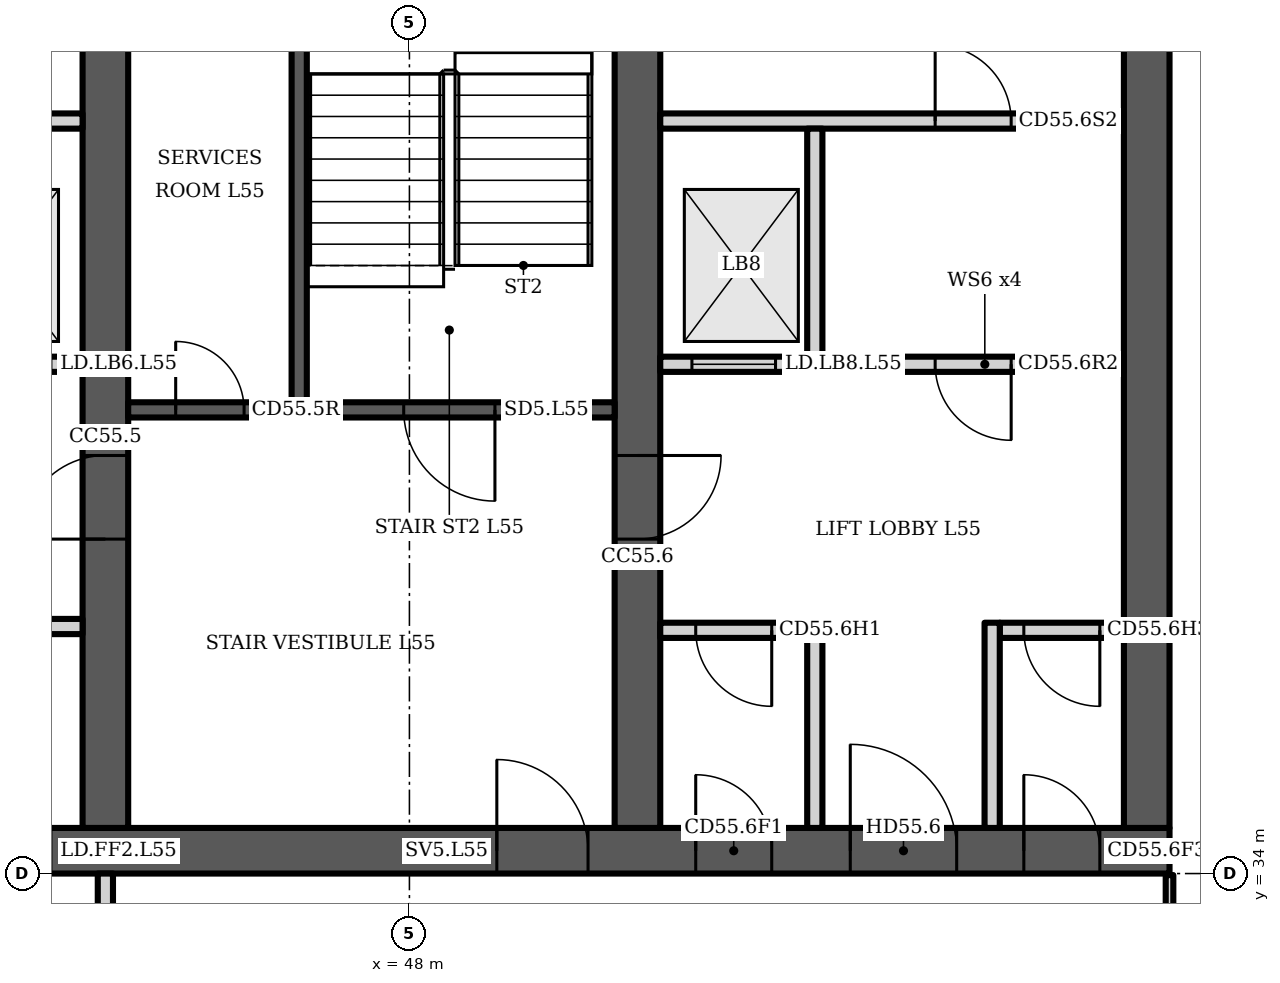
"""IFC4 building model, lengths in metres.
Left out: names, types, materials, properties, quantities, classifications, styles, units other than length and angle.
Written with IfcOpenShell. Run it as: python <this file> out.ifc"""

import sys

from ifc_helpers import new_model, si_unit, direction, frame, frame_2d, origin, place, context, subcontext, project, spatial, polyline, rectangle, outline, extrude, element, fill, save


model = new_model("IFC4")
c1 = context("Model", 3, precision=1e-05, world=origin(), true_north=direction((0.0, 1.0)))
c2 = subcontext(c1, "Body", "Model", "MODEL_VIEW")
j1 = project(units=[si_unit("LENGTHUNIT", "METRE"), si_unit("PLANEANGLEUNIT", "RADIAN")], contexts=[c1])
p1 = place(None, origin())
s1 = spatial("IfcSite", under=j1, at=p1, CompositionType="ELEMENT")
p2 = place(p1, origin())
s2 = spatial("IfcBuilding", under=s1, at=p2, CompositionType="ELEMENT")
p3 = place(p2, frame((0.0, 0.0, 221.5)))
s3 = spatial("IfcBuildingStorey", under=s2, at=p3, CompositionType="ELEMENT", Elevation=221.5)
p4 = place(p3, frame((23.0, 34.3, 0.0), z_axis=(0.0, 0.0, 1.0), x_axis=(1.0, 0.0, 0.0)))
e1 = element("IfcWall", 1, at=p4, inside=s3, PredefinedType="SHEAR", context=c2, shape_type="SweptSolid", body=[
    extrude(rectangle(XDim=35.0, YDim=0.6, at=frame_2d((17.5, 0.0))), origin(), (0.0, 0.0, 1.0), 3.6),
])
p5 = place(p4, frame((0.65, 0.0, 0.0)))
e2 = element("IfcOpeningElement", 2, at=p5, cuts=e1, PredefinedType="OPENING", context=c2, shape_type="SweptSolid", body=[
    extrude(rectangle(XDim=1.2, YDim=2.1, at=frame_2d((0.6, 1.05))), frame((0.0, 0.31, 0.0), z_axis=(0.0, -1.0, 0.0), x_axis=(1.0, 0.0, 0.0)), (0.0, 0.0, 1.0), 0.62),
])
p6 = place(p4, frame((7.717, 0.0, 0.0)))
e3 = element("IfcOpeningElement", 3, at=p6, cuts=e1, PredefinedType="OPENING", context=c2, shape_type="SweptSolid", body=[
    extrude(rectangle(XDim=1.1, YDim=2.1, at=frame_2d((0.55, 1.05))), frame((0.0, 0.31, 0.0), z_axis=(0.0, -1.0, 0.0), x_axis=(1.0, 0.0, 0.0)), (0.0, 0.0, 1.0), 0.62),
])
p7 = place(p4, frame((12.183, 0.0, 0.0)))
e4 = element("IfcOpeningElement", 4, at=p7, cuts=e1, PredefinedType="OPENING", context=c2, shape_type="SweptSolid", body=[
    extrude(rectangle(XDim=1.1, YDim=2.1, at=frame_2d((0.55, 1.05))), frame((0.0, 0.31, 0.0), z_axis=(0.0, -1.0, 0.0), x_axis=(1.0, 0.0, 0.0)), (0.0, 0.0, 1.0), 0.62),
])
p8 = place(p4, frame((9.8, 0.0, 0.0)))
e5 = element("IfcOpeningElement", 5, at=p8, cuts=e1, PredefinedType="OPENING", context=c2, shape_type="SweptSolid", body=[
    extrude(rectangle(XDim=1.4, YDim=2.1, at=frame_2d((0.7, 1.05))), frame((0.0, 0.31, 0.0), z_axis=(0.0, -1.0, 0.0), x_axis=(1.0, 0.0, 0.0)), (0.0, 0.0, 1.0), 0.62),
])
p9 = place(p4, frame((14.717, 0.0, 0.0)))
e6 = element("IfcOpeningElement", 6, at=p9, cuts=e1, PredefinedType="OPENING", context=c2, shape_type="SweptSolid", body=[
    extrude(rectangle(XDim=1.1, YDim=2.1, at=frame_2d((0.55, 1.05))), frame((0.0, 0.31, 0.0), z_axis=(0.0, -1.0, 0.0), x_axis=(1.0, 0.0, 0.0)), (0.0, 0.0, 1.0), 0.62),
])
p10 = place(p4, frame((16.95, 0.0, 0.0)))
e7 = element("IfcOpeningElement", 7, at=p10, cuts=e1, PredefinedType="OPENING", context=c2, shape_type="SweptSolid", body=[
    extrude(rectangle(XDim=1.1, YDim=2.1, at=frame_2d((0.55, 1.05))), frame((0.0, 0.31, 0.0), z_axis=(0.0, -1.0, 0.0), x_axis=(1.0, 0.0, 0.0)), (0.0, 0.0, 1.0), 0.62),
])
p11 = place(p4, frame((19.183, 0.0, 0.0)))
e8 = element("IfcOpeningElement", 8, at=p11, cuts=e1, PredefinedType="OPENING", context=c2, shape_type="SweptSolid", body=[
    extrude(rectangle(XDim=1.1, YDim=2.1, at=frame_2d((0.55, 1.05))), frame((0.0, 0.31, 0.0), z_axis=(0.0, -1.0, 0.0), x_axis=(1.0, 0.0, 0.0)), (0.0, 0.0, 1.0), 0.62),
])
p12 = place(p4, frame((26.15, 0.0, 0.0)))
e9 = element("IfcOpeningElement", 9, at=p12, cuts=e1, PredefinedType="OPENING", context=c2, shape_type="SweptSolid", body=[
    extrude(rectangle(XDim=1.2, YDim=2.1, at=frame_2d((0.6, 1.05))), frame((0.0, 0.31, 0.0), z_axis=(0.0, -1.0, 0.0), x_axis=(1.0, 0.0, 0.0)), (0.0, 0.0, 1.0), 0.62),
])
p13 = place(p4, frame((28.767, 0.0, 0.0)))
e10 = element("IfcOpeningElement", 10, at=p13, cuts=e1, PredefinedType="OPENING", context=c2, shape_type="SweptSolid", body=[
    extrude(rectangle(XDim=1.0, YDim=2.1, at=frame_2d((0.5, 1.05))), frame((0.0, 0.31, 0.0), z_axis=(0.0, -1.0, 0.0), x_axis=(1.0, 0.0, 0.0)), (0.0, 0.0, 1.0), 0.62),
])
p14 = place(p4, frame((33.083, 0.0, 0.0)))
e11 = element("IfcOpeningElement", 11, at=p14, cuts=e1, PredefinedType="OPENING", context=c2, shape_type="SweptSolid", body=[
    extrude(rectangle(XDim=1.0, YDim=2.1, at=frame_2d((0.5, 1.05))), frame((0.0, 0.31, 0.0), z_axis=(0.0, -1.0, 0.0), x_axis=(1.0, 0.0, 0.0)), (0.0, 0.0, 1.0), 0.62),
])
p15 = place(p4, frame((30.8, 0.0, 0.0)))
e12 = element("IfcOpeningElement", 12, at=p15, cuts=e1, PredefinedType="OPENING", context=c2, shape_type="SweptSolid", body=[
    extrude(rectangle(XDim=1.4, YDim=2.1, at=frame_2d((0.7, 1.05))), frame((0.0, 0.31, 0.0), z_axis=(0.0, -1.0, 0.0), x_axis=(1.0, 0.0, 0.0)), (0.0, 0.0, 1.0), 0.62),
])
p16 = place(p3, frame((44.0, 34.6, 0.0), z_axis=(0.0, 0.0, 1.0), x_axis=(0.0, 1.0, 0.0)))
e13 = element("IfcWall", 13, at=p16, inside=s3, PredefinedType="SHEAR", context=c2, shape_type="SweptSolid", body=[
    extrude(rectangle(XDim=14.784, YDim=0.6, at=frame_2d((7.392, 0.0))), origin(), (0.0, 0.0, 1.0), 3.6),
])
p17 = place(p16, frame((11.608, 0.0, 0.0)))
e14 = element("IfcOpeningElement", 14, at=p17, cuts=e13, PredefinedType="OPENING", context=c2, shape_type="SweptSolid", body=[
    extrude(rectangle(XDim=1.0, YDim=2.1, at=frame_2d((0.5, 1.05))), frame((0.0, 0.31, 0.0), z_axis=(0.0, -1.0, 0.0), x_axis=(1.0, 0.0, 0.0)), (0.0, 0.0, 1.0), 0.62),
])
p18 = place(p16, frame((3.8, 0.0, 0.0)))
e15 = element("IfcOpeningElement", 15, at=p18, cuts=e13, PredefinedType="OPENING", context=c2, shape_type="SweptSolid", body=[
    extrude(rectangle(XDim=1.1, YDim=2.1, at=frame_2d((0.55, 1.05))), frame((0.0, 0.31, 0.0), z_axis=(0.0, -1.0, 0.0), x_axis=(1.0, 0.0, 0.0)), (0.0, 0.0, 1.0), 0.62),
])
p19 = place(p3, frame((51.0, 34.6, 0.0), z_axis=(0.0, 0.0, 1.0), x_axis=(0.0, 1.0, 0.0)))
e16 = element("IfcWall", 16, at=p19, inside=s3, PredefinedType="SHEAR", context=c2, shape_type="SweptSolid", body=[
    extrude(rectangle(XDim=14.171, YDim=0.6, at=frame_2d((7.085, 0.0))), origin(), (0.0, 0.0, 1.0), 3.6),
])
p20 = place(p19, frame((3.8, 0.0, 0.0)))
e17 = element("IfcOpeningElement", 17, at=p20, cuts=e16, PredefinedType="OPENING", context=c2, shape_type="SweptSolid", body=[
    extrude(rectangle(XDim=1.1, YDim=2.1, at=frame_2d((0.55, 1.05))), frame((0.0, 0.31, 0.0), z_axis=(0.0, -1.0, 0.0), x_axis=(1.0, 0.0, 0.0)), (0.0, 0.0, 1.0), 0.62),
])
p21 = place(p3, frame((57.7, 34.6, 0.0), z_axis=(0.0, 0.0, 1.0), x_axis=(0.0, 1.0, 0.0)))
e18 = element("IfcWall", 18, at=p21, inside=s3, PredefinedType="SHEAR", context=c2, shape_type="SweptSolid", body=[
    extrude(rectangle(XDim=13.585, YDim=0.6, at=frame_2d((6.792, 0.0))), origin(), (0.0, 0.0, 1.0), 3.6),
])
p22 = place(p3, frame((37.3, 40.7, 0.0), z_axis=(0.0, 0.0, 1.0), x_axis=(1.0, 0.0, 0.0)))
e19 = element("IfcWall", 19, at=p22, inside=s3, PredefinedType="PARTITIONING", context=c2, shape_type="SweptSolid", body=[
    extrude(rectangle(XDim=6.4, YDim=0.2, at=frame_2d((3.2, 0.0))), origin(), (0.0, 0.0, 1.0), 3.2),
])
p23 = place(p22, frame((0.417, 0.0, 0.0)))
e20 = element("IfcOpeningElement", 20, at=p23, cuts=e19, PredefinedType="OPENING", context=c2, shape_type="SweptSolid", body=[
    extrude(rectangle(XDim=1.1, YDim=2.1, at=frame_2d((0.55, 1.05))), frame((0.0, 0.11, 0.0), z_axis=(0.0, -1.0, 0.0), x_axis=(1.0, 0.0, 0.0)), (0.0, 0.0, 1.0), 0.22),
])
p24 = place(p22, frame((2.65, 0.0, 0.0)))
e21 = element("IfcOpeningElement", 21, at=p24, cuts=e19, PredefinedType="OPENING", context=c2, shape_type="SweptSolid", body=[
    extrude(rectangle(XDim=1.1, YDim=2.1, at=frame_2d((0.55, 1.05))), frame((0.0, 0.11, 0.0), z_axis=(0.0, -1.0, 0.0), x_axis=(1.0, 0.0, 0.0)), (0.0, 0.0, 1.0), 0.22),
])
p25 = place(p22, frame((4.883, 0.0, 0.0)))
e22 = element("IfcOpeningElement", 22, at=p25, cuts=e19, PredefinedType="OPENING", context=c2, shape_type="SweptSolid", body=[
    extrude(rectangle(XDim=1.1, YDim=2.1, at=frame_2d((0.55, 1.05))), frame((0.0, 0.11, 0.0), z_axis=(0.0, -1.0, 0.0), x_axis=(1.0, 0.0, 0.0)), (0.0, 0.0, 1.0), 0.22),
])
p26 = place(p3, frame((0.0, 0.0, -0.0)))
e23 = element("IfcWall", 23, at=p26, inside=s3, PredefinedType="PARTITIONING", context=c2, shape_type="SweptSolid", body=[
    extrude(outline(polyline([(41.567, 37.1), (39.433, 37.1), (39.433, 34.6), (39.233, 34.6), (39.233, 37.45), (37.3, 37.45), (37.3, 37.65), (39.233, 37.65), (39.433, 37.65), (39.433, 37.3), (41.567, 37.3), (41.567, 37.35), (41.767, 37.35), (43.7, 37.35), (43.7, 37.15), (41.767, 37.15), (41.767, 34.6), (41.567, 34.6), (41.567, 37.1)])), origin(), (0.0, 0.0, 1.0), 3.2),
])
p27 = place(p3, frame((0.0, 0.0, -0.0)))
e24 = element("IfcWall", 24, at=p27, inside=s3, PredefinedType="PARTITIONING", context=c2, shape_type="SweptSolid", body=[
    extrude(outline(polyline([(39.433, 40.8), (39.233, 40.8), (39.233, 43.8), (37.3, 43.8), (37.3, 44.0), (43.7, 44.0), (43.7, 43.8), (41.767, 43.8), (41.767, 40.8), (41.567, 40.8), (41.567, 43.8), (39.433, 43.8), (39.433, 40.8)])), origin(), (0.0, 0.0, 1.0), 3.2),
])
p28 = place(p3, frame((44.3, 40.1, 0.0), z_axis=(0.0, 0.0, 1.0), x_axis=(1.0, 0.0, 0.0)))
e25 = element("IfcWall", 25, at=p28, inside=s3, PredefinedType="SHEAR", context=c2, shape_type="SweptSolid", body=[
    extrude(rectangle(XDim=6.4, YDim=0.2, at=frame_2d((3.2, 0.0))), origin(), (0.0, 0.0, 1.0), 3.2),
])
p29 = place(p28, frame((3.625, 0.0, 0.0)))
e26 = element("IfcOpeningElement", 26, at=p29, cuts=e25, PredefinedType="OPENING", context=c2, shape_type="SweptSolid", body=[
    extrude(rectangle(XDim=1.2, YDim=2.1, at=frame_2d((0.6, 1.05))), frame((0.0, 0.11, 0.0), z_axis=(0.0, -1.0, 0.0), x_axis=(1.0, 0.0, 0.0)), (0.0, 0.0, 1.0), 0.22),
])
p30 = place(p28, frame((0.625, 0.0, 0.0)))
e27 = element("IfcOpeningElement", 27, at=p30, cuts=e25, PredefinedType="OPENING", context=c2, shape_type="SweptSolid", body=[
    extrude(rectangle(XDim=0.9, YDim=2.1, at=frame_2d((0.45, 1.05))), frame((0.0, 0.11, 0.0), z_axis=(0.0, -1.0, 0.0), x_axis=(1.0, 0.0, 0.0)), (0.0, 0.0, 1.0), 0.22),
])
p31 = place(p3, frame((46.55, 40.2, 0.0), z_axis=(0.0, 0.0, 1.0), x_axis=(0.0, 1.0, 0.0)))
e28 = element("IfcWall", 28, at=p31, inside=s3, PredefinedType="SHEAR", context=c2, shape_type="SweptSolid", body=[
    extrude(rectangle(XDim=7.2, YDim=0.2, at=frame_2d((3.6, 0.0))), origin(), (0.0, 0.0, 1.0), 3.2),
])
p32 = place(p3, frame((51.3, 37.2, 0.0), z_axis=(0.0, 0.0, 1.0), x_axis=(1.0, 0.0, 0.0)))
e29 = element("IfcWall", 29, at=p32, inside=s3, PredefinedType="PARTITIONING", context=c2, shape_type="SweptSolid", body=[
    extrude(rectangle(XDim=1.933, YDim=0.2, at=frame_2d((0.967, 0.0))), origin(), (0.0, 0.0, 1.0), 3.2),
])
p33 = place(p32, frame((0.467, 0.0, 0.0)))
e30 = element("IfcOpeningElement", 30, at=p33, cuts=e29, PredefinedType="OPENING", context=c2, shape_type="SweptSolid", body=[
    extrude(rectangle(XDim=1.0, YDim=2.1, at=frame_2d((0.5, 1.05))), frame((0.0, 0.11, 0.0), z_axis=(0.0, -1.0, 0.0), x_axis=(1.0, 0.0, 0.0)), (0.0, 0.0, 1.0), 0.22),
])
p34 = place(p3, frame((55.767, 37.2, 0.0), z_axis=(0.0, 0.0, 1.0), x_axis=(1.0, 0.0, 0.0)))
e31 = element("IfcWall", 31, at=p34, inside=s3, PredefinedType="PARTITIONING", context=c2, shape_type="SweptSolid", body=[
    extrude(rectangle(XDim=1.633, YDim=0.2, at=frame_2d((0.817, 0.0))), origin(), (0.0, 0.0, 1.0), 3.2),
])
p35 = place(p34, frame((0.317, 0.0, 0.0)))
e32 = element("IfcOpeningElement", 32, at=p35, cuts=e31, PredefinedType="OPENING", context=c2, shape_type="SweptSolid", body=[
    extrude(rectangle(XDim=1.0, YDim=2.1, at=frame_2d((0.5, 1.05))), frame((0.0, 0.11, 0.0), z_axis=(0.0, -1.0, 0.0), x_axis=(1.0, 0.0, 0.0)), (0.0, 0.0, 1.0), 0.22),
])
p36 = place(p3, frame((51.3, 40.7, 0.0), z_axis=(0.0, 0.0, 1.0), x_axis=(1.0, 0.0, 0.0)))
e33 = element("IfcWall", 33, at=p36, inside=s3, PredefinedType="PARTITIONING", context=c2, shape_type="SweptSolid", body=[
    extrude(rectangle(XDim=6.1, YDim=0.2, at=frame_2d((3.05, 0.0))), origin(), (0.0, 0.0, 1.0), 3.2),
])
p37 = place(p36, frame((0.417, 0.0, 0.0)))
e34 = element("IfcOpeningElement", 34, at=p37, cuts=e33, PredefinedType="OPENING", context=c2, shape_type="SweptSolid", body=[
    extrude(rectangle(XDim=1.1, YDim=2.1, at=frame_2d((0.55, 1.05))), frame((0.0, 0.11, 0.0), z_axis=(0.0, -1.0, 0.0), x_axis=(1.0, 0.0, 0.0)), (0.0, 0.0, 1.0), 0.22),
])
p38 = place(p36, frame((3.617, 0.0, 0.0)))
e35 = element("IfcOpeningElement", 35, at=p38, cuts=e33, PredefinedType="OPENING", context=c2, shape_type="SweptSolid", body=[
    extrude(rectangle(XDim=1.0, YDim=2.1, at=frame_2d((0.5, 1.05))), frame((0.0, 0.11, 0.0), z_axis=(0.0, -1.0, 0.0), x_axis=(1.0, 0.0, 0.0)), (0.0, 0.0, 1.0), 0.22),
])
p39 = place(p3, frame((51.3, 43.9, 0.0), z_axis=(0.0, 0.0, 1.0), x_axis=(1.0, 0.0, 0.0)))
e36 = element("IfcWall", 36, at=p39, inside=s3, PredefinedType="PARTITIONING", context=c2, shape_type="SweptSolid", body=[
    extrude(rectangle(XDim=6.1, YDim=0.2, at=frame_2d((3.05, 0.0))), origin(), (0.0, 0.0, 1.0), 3.2),
])
p40 = place(p39, frame((3.617, 0.0, 0.0)))
e37 = element("IfcOpeningElement", 37, at=p40, cuts=e36, PredefinedType="OPENING", context=c2, shape_type="SweptSolid", body=[
    extrude(rectangle(XDim=1.0, YDim=2.1, at=frame_2d((0.5, 1.05))), frame((0.0, 0.11, 0.0), z_axis=(0.0, -1.0, 0.0), x_axis=(1.0, 0.0, 0.0)), (0.0, 0.0, 1.0), 0.22),
])
p41 = place(p3, frame((0.0, 0.0, -0.0)))
e38 = element("IfcWall", 38, at=p41, inside=s3, PredefinedType="PARTITIONING", context=c2, shape_type="SweptSolid", body=[
    extrude(outline(polyline([(53.233, 34.6), (53.233, 37.3), (53.433, 37.3), (53.433, 34.6), (53.233, 34.6)])), origin(), (0.0, 0.0, 1.0), 3.2),
])
p42 = place(p3, frame((0.0, 0.0, -0.0)))
e39 = element("IfcWall", 39, at=p42, inside=s3, PredefinedType="PARTITIONING", context=c2, shape_type="SweptSolid", body=[
    extrude(outline(polyline([(55.567, 34.6), (55.567, 37.3), (55.767, 37.3), (55.767, 34.6), (55.567, 34.6)])), origin(), (0.0, 0.0, 1.0), 3.2),
])
p43 = place(p3, frame((0.0, 0.0, -0.0)))
e40 = element("IfcWall", 40, at=p43, inside=s3, PredefinedType="PARTITIONING", context=c2, shape_type="SweptSolid", body=[
    extrude(outline(polyline([(53.433, 40.8), (53.433, 43.8), (53.233, 43.8), (53.233, 40.8), (53.433, 40.8)])), origin(), (0.0, 0.0, 1.0), 3.2),
])
p44 = place(p3, frame((44.0, 30.5, 0.0), z_axis=(0.0, 0.0, 1.0), x_axis=(0.0, 1.0, 0.0)))
e41 = element("IfcWall", 41, at=p44, inside=s3, PredefinedType="PARTITIONING", context=c2, shape_type="SweptSolid", body=[
    extrude(rectangle(XDim=3.5, YDim=0.2, at=frame_2d((1.75, 0.0))), origin(), (0.0, 0.0, 1.0), 3.2),
])
p45 = place(p44, frame((1.2, 0.0, 0.0)))
e42 = element("IfcOpeningElement", 42, at=p45, cuts=e41, PredefinedType="OPENING", context=c2, shape_type="SweptSolid", body=[
    extrude(rectangle(XDim=1.1, YDim=2.1, at=frame_2d((0.55, 1.05))), frame((0.0, 0.11, 0.0), z_axis=(0.0, -1.0, 0.0), x_axis=(1.0, 0.0, 0.0)), (0.0, 0.0, 1.0), 0.22),
])
p46 = place(p3, frame((58.0, 31.5, 0.0), z_axis=(0.0, 0.0, 1.0), x_axis=(0.0, 1.0, 0.0)))
e43 = element("IfcWall", 43, at=p46, inside=s3, PredefinedType="PARTITIONING", context=c2, shape_type="SweptSolid", body=[
    extrude(rectangle(XDim=2.48, YDim=0.1, at=frame_2d((1.24, 0.0))), origin(), (0.0, 0.0, 1.0), 3.2),
])
p47 = place(p29, origin())
e44 = element("IfcDoor", 44, at=p47, inside=s3, OperationType="SINGLE_SWING_RIGHT", PredefinedType="DOOR", context=c2, shape_type="SweptSolid", body=[
    extrude(rectangle(XDim=1.2, YDim=2.1, at=frame_2d((0.6, 1.05))), frame((0.0, 0.025, 0.0), z_axis=(0.0, -1.0, 0.0), x_axis=(1.0, 0.0, 0.0)), (0.0, 0.0, 1.0), 0.05),
])
fill(e26, e44)
p48 = place(p30, origin())
e45 = element("IfcDoor", 45, at=p48, inside=s3, OperationType="SINGLE_SWING_LEFT", PredefinedType="DOOR", context=c2, shape_type="SweptSolid", body=[
    extrude(rectangle(XDim=0.9, YDim=2.1, at=frame_2d((0.45, 1.05))), frame((0.0, 0.025, 0.0), z_axis=(0.0, -1.0, 0.0), x_axis=(1.0, 0.0, 0.0)), (0.0, 0.0, 1.0), 0.05),
])
fill(e27, e45)
p49 = place(p12, origin())
e46 = element("IfcDoor", 46, at=p49, inside=s3, OperationType="SINGLE_SWING_LEFT", PredefinedType="DOOR", context=c2, shape_type="SweptSolid", body=[
    extrude(rectangle(XDim=1.2, YDim=2.1, at=frame_2d((0.6, 1.05))), frame((0.0, 0.025, 0.0), z_axis=(0.0, -1.0, 0.0), x_axis=(1.0, 0.0, 0.0)), (0.0, 0.0, 1.0), 0.05),
])
fill(e9, e46)
p50 = place(p13, origin())
e47 = element("IfcDoor", 47, at=p50, inside=s3, OperationType="SINGLE_SWING_LEFT", PredefinedType="DOOR", context=c2, shape_type="SweptSolid", body=[
    extrude(rectangle(XDim=1.0, YDim=2.1, at=frame_2d((0.5, 1.05))), frame((0.0, 0.025, 0.0), z_axis=(0.0, -1.0, 0.0), x_axis=(1.0, 0.0, 0.0)), (0.0, 0.0, 1.0), 0.05),
])
fill(e10, e47)
p51 = place(p33, origin())
e48 = element("IfcDoor", 48, at=p51, inside=s3, OperationType="SINGLE_SWING_RIGHT", PredefinedType="DOOR", context=c2, shape_type="SweptSolid", body=[
    extrude(rectangle(XDim=1.0, YDim=2.1, at=frame_2d((0.5, 1.05))), frame((0.0, 0.025, 0.0), z_axis=(0.0, -1.0, 0.0), x_axis=(1.0, 0.0, 0.0)), (0.0, 0.0, 1.0), 0.05),
])
fill(e30, e48)
p52 = place(p14, origin())
e49 = element("IfcDoor", 49, at=p52, inside=s3, OperationType="SINGLE_SWING_LEFT", PredefinedType="DOOR", context=c2, shape_type="SweptSolid", body=[
    extrude(rectangle(XDim=1.0, YDim=2.1, at=frame_2d((0.5, 1.05))), frame((0.0, 0.025, 0.0), z_axis=(0.0, -1.0, 0.0), x_axis=(1.0, 0.0, 0.0)), (0.0, 0.0, 1.0), 0.05),
])
fill(e11, e49)
p53 = place(p35, origin())
e50 = element("IfcDoor", 50, at=p53, inside=s3, OperationType="SINGLE_SWING_RIGHT", PredefinedType="DOOR", context=c2, shape_type="SweptSolid", body=[
    extrude(rectangle(XDim=1.0, YDim=2.1, at=frame_2d((0.5, 1.05))), frame((0.0, 0.025, 0.0), z_axis=(0.0, -1.0, 0.0), x_axis=(1.0, 0.0, 0.0)), (0.0, 0.0, 1.0), 0.05),
])
fill(e32, e50)
p54 = place(p15, origin())
e51 = element("IfcDoor", 51, at=p54, inside=s3, OperationType="DOUBLE_DOOR_SINGLE_SWING", PredefinedType="DOOR", context=c2, shape_type="SweptSolid", body=[
    extrude(rectangle(XDim=1.4, YDim=2.1, at=frame_2d((0.7, 1.05))), frame((0.0, 0.025, 0.0), z_axis=(0.0, -1.0, 0.0), x_axis=(1.0, 0.0, 0.0)), (0.0, 0.0, 1.0), 0.05),
])
fill(e12, e51)
p55 = place(p37, origin())
e52 = element("IfcDoor", 52, at=p55, inside=s3, OperationType="DOUBLE_DOOR_SLIDING", PredefinedType="DOOR", context=c2, shape_type="SweptSolid", body=[
    extrude(rectangle(XDim=1.1, YDim=2.1, at=frame_2d((0.55, 1.05))), frame((0.0, 0.025, 0.0), z_axis=(0.0, -1.0, 0.0), x_axis=(1.0, 0.0, 0.0)), (0.0, 0.0, 1.0), 0.05),
])
fill(e34, e52)
p56 = place(p38, origin())
e53 = element("IfcDoor", 53, at=p56, inside=s3, OperationType="SINGLE_SWING_RIGHT", PredefinedType="DOOR", context=c2, shape_type="SweptSolid", body=[
    extrude(rectangle(XDim=1.0, YDim=2.1, at=frame_2d((0.5, 1.05))), frame((0.0, 0.025, 0.0), z_axis=(0.0, -1.0, 0.0), x_axis=(1.0, 0.0, 0.0)), (0.0, 0.0, 1.0), 0.05),
])
fill(e35, e53)
p57 = place(p40, origin())
e54 = element("IfcDoor", 54, at=p57, inside=s3, OperationType="SINGLE_SWING_LEFT", PredefinedType="DOOR", context=c2, shape_type="SweptSolid", body=[
    extrude(rectangle(XDim=1.0, YDim=2.1, at=frame_2d((0.5, 1.05))), frame((0.0, 0.025, 0.0), z_axis=(0.0, -1.0, 0.0), x_axis=(1.0, 0.0, 0.0)), (0.0, 0.0, 1.0), 0.05),
])
fill(e37, e54)
p58 = place(p18, origin())
e55 = element("IfcDoor", 55, at=p58, inside=s3, OperationType="SINGLE_SWING_LEFT", PredefinedType="DOOR", context=c2, shape_type="SweptSolid", body=[
    extrude(rectangle(XDim=1.1, YDim=2.1, at=frame_2d((0.55, 1.05))), frame((0.0, 0.025, 0.0), z_axis=(0.0, -1.0, 0.0), x_axis=(1.0, 0.0, 0.0)), (0.0, 0.0, 1.0), 0.05),
])
fill(e15, e55)
p59 = place(p20, origin())
e56 = element("IfcDoor", 56, at=p59, inside=s3, OperationType="SINGLE_SWING_RIGHT", PredefinedType="DOOR", context=c2, shape_type="SweptSolid", body=[
    extrude(rectangle(XDim=1.1, YDim=2.1, at=frame_2d((0.55, 1.05))), frame((0.0, 0.025, 0.0), z_axis=(0.0, -1.0, 0.0), x_axis=(1.0, 0.0, 0.0)), (0.0, 0.0, 1.0), 0.05),
])
fill(e17, e56)
save(model, sys.argv[1])
